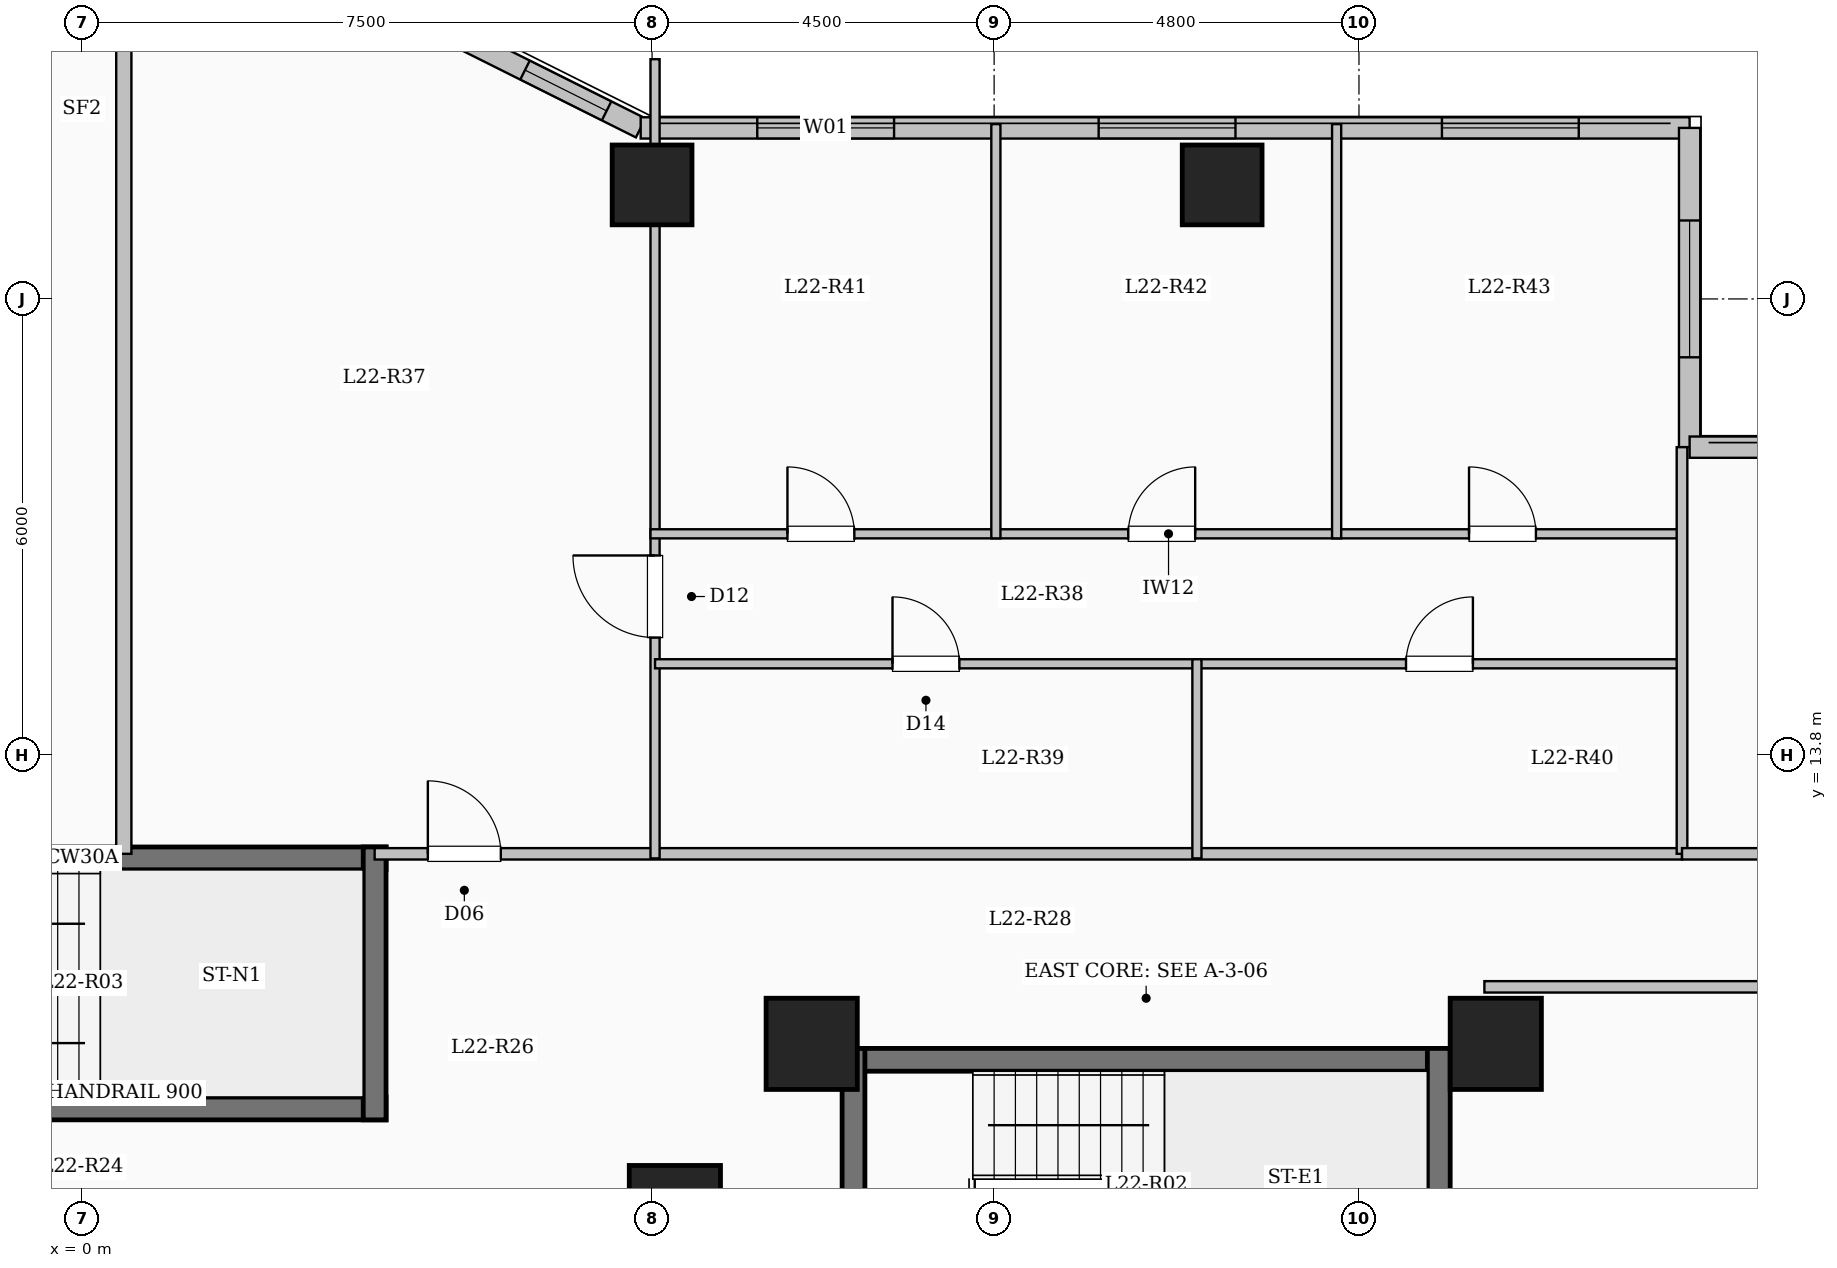
"""IFC4 building model, lengths in metres.
Left out: names, types, materials, properties, quantities, classifications, styles, units other than length and angle.
Written with IfcOpenShell. Run it as: python <this file> out.ifc"""

import sys

from ifc_helpers import new_model, si_unit, direction, frame, frame_2d, origin, origin_2d, place, context, subcontext, project, spatial, rectangle, extrude, element, fill, save


model = new_model("IFC4")
c1 = context("Model", 3, precision=1e-05, world=origin(), true_north=direction((0.0, 1.0)))
c2 = subcontext(c1, "Body", "Model", "MODEL_VIEW")
j1 = project(units=[si_unit("LENGTHUNIT", "METRE"), si_unit("PLANEANGLEUNIT", "RADIAN")], contexts=[c1])
p1 = place(None, origin())
s1 = spatial("IfcSite", under=j1, at=p1, CompositionType="ELEMENT")
p2 = place(p1, origin())
s2 = spatial("IfcBuilding", under=s1, at=p2, CompositionType="ELEMENT")
p3 = place(p2, frame((0.0, 0.0, 85.0)))
s3 = spatial("IfcBuildingStorey", under=s2, at=p3, CompositionType="ELEMENT", Elevation=85.0)
for number, where, z_axis, x_axis in (
    (1, (7.8, 7.8, 0.0), (0.0, 0.0, 1.0), (1.0, 0.0, 0.0)),
    (2, (9.6, 10.0, 0.0), (0.0, 0.0, 1.0), (1.0, 0.0, 0.0)),
    (3, (18.6, 10.0, 0.0), (0.0, 0.0, 1.0), (1.0, 0.0, 0.0)),
):
    element("IfcColumn", number, at=place(p3, frame(where, z_axis=z_axis, x_axis=x_axis)), inside=s3, PredefinedType="COLUMN", context=c2, shape_type="SweptSolid", body=[
        extrude(rectangle(XDim=1.2, YDim=1.2, at=origin_2d()), origin(), (0.0, 0.0, 1.0), 3.35),
    ])
for number, where, z_axis, x_axis in (
    (4, (7.5, 21.3, 0.0), (0.0, 0.0, 1.0), (1.0, 0.0, 0.0)),
    (5, (15.0, 21.3, 0.0), (0.0, 0.0, 1.0), (1.0, 0.0, 0.0)),
):
    element("IfcColumn", number, at=place(p3, frame(where, z_axis=z_axis, x_axis=x_axis)), inside=s3, PredefinedType="COLUMN", context=c2, shape_type="SweptSolid", body=[
        extrude(rectangle(XDim=1.05, YDim=1.05, at=origin_2d()), origin(), (0.0, 0.0, 1.0), 3.35),
    ])
p4 = place(p3, frame((4.35, 23.55, 0.0), z_axis=(0.0, 0.0, 1.0), x_axis=(0.894427191, -0.4472135955, 0.0)))
e6 = element("IfcWall", 6, at=p4, inside=s3, PredefinedType="SOLIDWALL", context=c2, shape_type="SweptSolid", body=[
    extrude(rectangle(XDim=3.354, YDim=0.28, at=frame_2d((1.677, 0.0))), origin(), (0.0, 0.0, 1.0), 3.1),
])
p5 = place(p4, frame((1.653, 0.0, 0.95)))
e7 = element("IfcOpeningElement", 7, at=p5, cuts=e6, PredefinedType="OPENING", context=c2, shape_type="SweptSolid", body=[
    extrude(rectangle(XDim=1.2, YDim=1.5, at=frame_2d((0.6, 0.75))), frame((0.0, 0.15, 0.0), z_axis=(0.0, -1.0, 0.0), x_axis=(1.0, 0.0, 0.0)), (0.0, 0.0, 1.0), 0.3),
])
p6 = place(p3, frame((7.35, 22.05, 0.0), z_axis=(0.0, 0.0, 1.0), x_axis=(1.0, 0.0, 0.0)))
e8 = element("IfcWall", 8, at=p6, inside=s3, PredefinedType="SOLIDWALL", context=c2, shape_type="SweptSolid", body=[
    extrude(rectangle(XDim=13.8, YDim=0.28, at=frame_2d((6.9, 0.0))), origin(), (0.0, 0.0, 1.0), 3.1),
])
p7 = place(p6, frame((1.534, 0.0, 0.9)))
e9 = element("IfcOpeningElement", 9, at=p7, cuts=e8, PredefinedType="OPENING", context=c2, shape_type="SweptSolid", body=[
    extrude(rectangle(XDim=1.8, YDim=1.65, at=frame_2d((0.9, 0.825))), frame((0.0, 0.15, 0.0), z_axis=(0.0, -1.0, 0.0), x_axis=(1.0, 0.0, 0.0)), (0.0, 0.0, 1.0), 0.3),
])
p8 = place(p6, frame((6.025, 0.0, 0.9)))
e10 = element("IfcOpeningElement", 10, at=p8, cuts=e8, PredefinedType="OPENING", context=c2, shape_type="SweptSolid", body=[
    extrude(rectangle(XDim=1.8, YDim=1.65, at=frame_2d((0.9, 0.825))), frame((0.0, 0.15, 0.0), z_axis=(0.0, -1.0, 0.0), x_axis=(1.0, 0.0, 0.0)), (0.0, 0.0, 1.0), 0.3),
])
p9 = place(p6, frame((10.542, 0.0, 0.9)))
e11 = element("IfcOpeningElement", 11, at=p9, cuts=e8, PredefinedType="OPENING", context=c2, shape_type="SweptSolid", body=[
    extrude(rectangle(XDim=1.8, YDim=1.65, at=frame_2d((0.9, 0.825))), frame((0.0, 0.15, 0.0), z_axis=(0.0, -1.0, 0.0), x_axis=(1.0, 0.0, 0.0)), (0.0, 0.0, 1.0), 0.3),
])
p10 = place(p3, frame((21.15, 22.05, 0.0), z_axis=(0.0, 0.0, 1.0), x_axis=(0.0, -1.0, 0.0)))
e12 = element("IfcWall", 12, at=p10, inside=s3, PredefinedType="SOLIDWALL", context=c2, shape_type="SweptSolid", body=[
    extrude(rectangle(XDim=4.2, YDim=0.28, at=frame_2d((2.1, 0.0))), origin(), (0.0, 0.0, 1.0), 3.1),
])
p11 = place(p10, frame((1.218, 0.0, 0.9)))
e13 = element("IfcOpeningElement", 13, at=p11, cuts=e12, PredefinedType="OPENING", context=c2, shape_type="SweptSolid", body=[
    extrude(rectangle(XDim=1.8, YDim=1.65, at=frame_2d((0.9, 0.825))), frame((0.0, 0.15, 0.0), z_axis=(0.0, -1.0, 0.0), x_axis=(1.0, 0.0, 0.0)), (0.0, 0.0, 1.0), 0.3),
])
p12 = place(p3, frame((21.15, 17.85, 0.0), z_axis=(0.0, 0.0, 1.0), x_axis=(1.0, 0.0, 0.0)))
e14 = element("IfcWall", 14, at=p12, inside=s3, PredefinedType="SOLIDWALL", context=c2, shape_type="SweptSolid", body=[
    extrude(rectangle(XDim=5.7, YDim=0.28, at=frame_2d((2.85, 0.0))), origin(), (0.0, 0.0, 1.0), 3.1),
])
p13 = place(p12, frame((1.825, 0.0, 0.9)))
e15 = element("IfcOpeningElement", 15, at=p13, cuts=e14, PredefinedType="OPENING", context=c2, shape_type="SweptSolid", body=[
    extrude(rectangle(XDim=2.0, YDim=1.7, at=frame_2d((1.0, 0.85))), frame((0.0, 0.15, 0.0), z_axis=(0.0, -1.0, 0.0), x_axis=(1.0, 0.0, 0.0)), (0.0, 0.0, 1.0), 0.3),
])
p14 = place(p3, frame((10.0, 9.79, 0.0), z_axis=(0.0, 0.0, 1.0), x_axis=(1.0, 0.0, 0.0)))
e16 = element("IfcWall", 16, at=p14, inside=s3, PredefinedType="SHEAR", context=c2, shape_type="SweptSolid", body=[
    extrude(rectangle(XDim=8.0, YDim=0.3, at=frame_2d((4.0, 0.0))), origin(), (0.0, 0.0, 1.0), 3.35),
])
for number, where, z_axis, x_axis in (
    (17, (10.15, 6.35, 0.0), (0.0, 0.0, 1.0), (0.0, 1.0, 0.0)),
    (18, (17.85, 6.35, 0.0), (0.0, 0.0, 1.0), (0.0, 1.0, 0.0)),
):
    element("IfcWall", number, at=place(p3, frame(where, z_axis=z_axis, x_axis=x_axis)), inside=s3, PredefinedType="SHEAR", context=c2, shape_type="SweptSolid", body=[
        extrude(rectangle(XDim=3.59, YDim=0.3, at=frame_2d((1.795, 0.0))), origin(), (0.0, 0.0, 1.0), 3.35),
    ])
p15 = place(p3, frame((-4.0, 12.44, 0.0), z_axis=(0.0, 0.0, 1.0), x_axis=(1.0, 0.0, 0.0)))
e19 = element("IfcWall", 19, at=p15, inside=s3, PredefinedType="SHEAR", context=c2, shape_type="SweptSolid", body=[
    extrude(rectangle(XDim=8.0, YDim=0.3, at=frame_2d((4.0, 0.0))), origin(), (0.0, 0.0, 1.0), 3.35),
])
p16 = place(p3, frame((-4.0, 9.15, 0.0), z_axis=(0.0, 0.0, 1.0), x_axis=(1.0, 0.0, 0.0)))
e20 = element("IfcWall", 20, at=p16, inside=s3, PredefinedType="SHEAR", context=c2, shape_type="SweptSolid", body=[
    extrude(rectangle(XDim=8.0, YDim=0.3, at=frame_2d((4.0, 0.0))), origin(), (0.0, 0.0, 1.0), 3.35),
])
p17 = place(p16, frame((0.55, 0.0, 0.0)))
e21 = element("IfcOpeningElement", 21, at=p17, cuts=e20, PredefinedType="OPENING", context=c2, shape_type="SweptSolid", body=[
    extrude(rectangle(XDim=1.0, YDim=2.15, at=frame_2d((0.5, 1.075))), frame((0.0, 0.16, 0.0), z_axis=(0.0, -1.0, 0.0), x_axis=(1.0, 0.0, 0.0)), (0.0, 0.0, 1.0), 0.32),
])
p18 = place(p3, frame((3.85, 9.0, 0.0), z_axis=(0.0, 0.0, 1.0), x_axis=(0.0, 1.0, 0.0)))
e22 = element("IfcWall", 22, at=p18, inside=s3, PredefinedType="SHEAR", context=c2, shape_type="SweptSolid", body=[
    extrude(rectangle(XDim=3.59, YDim=0.3, at=frame_2d((1.795, 0.0))), origin(), (0.0, 0.0, 1.0), 3.35),
])
p19 = place(p3, frame((3.85, 12.5, 0.0), z_axis=(0.0, 0.0, 1.0), x_axis=(1.0, 0.0, 0.0)))
e23 = element("IfcWall", 23, at=p19, inside=s3, PredefinedType="PARTITIONING", context=c2, shape_type="SweptSolid", body=[
    extrude(rectangle(XDim=17.2, YDim=0.15, at=frame_2d((8.6, 0.0))), origin(), (0.0, 0.0, 1.0), 3.1),
])
p20 = place(p19, frame((0.7, 0.0, 0.0)))
e24 = element("IfcOpeningElement", 24, at=p20, cuts=e23, PredefinedType="OPENING", context=c2, shape_type="SweptSolid", body=[
    extrude(rectangle(XDim=0.96, YDim=2.15, at=frame_2d((0.48, 1.075))), frame((0.0, 0.085, 0.0), z_axis=(0.0, -1.0, 0.0), x_axis=(1.0, 0.0, 0.0)), (0.0, 0.0, 1.0), 0.17),
])
p21 = place(p3, frame((0.55, 12.5, 0.0), z_axis=(0.0, 0.0, 1.0), x_axis=(0.0, 1.0, 0.0)))
e25 = element("IfcWall", 25, at=p21, inside=s3, PredefinedType="SOLIDWALL", context=c2, shape_type="SweptSolid", body=[
    extrude(rectangle(XDim=11.08, YDim=0.2, at=frame_2d((5.54, 0.0))), origin(), (0.0, 0.0, 1.0), 3.1),
])
p22 = place(p3, frame((7.539, 12.44, 0.0), z_axis=(0.0, 0.0, 1.0), x_axis=(0.0, 1.0, 0.0)))
e26 = element("IfcWall", 26, at=p22, inside=s3, PredefinedType="PARTITIONING", context=c2, shape_type="SweptSolid", body=[
    extrude(rectangle(XDim=10.514, YDim=0.12, at=frame_2d((5.257, 0.0))), origin(), (0.0, 0.0, 1.0), 2.435),
])
p23 = place(p22, frame((2.905, 0.0, 0.0)))
e27 = element("IfcOpeningElement", 27, at=p23, cuts=e26, PredefinedType="OPENING", context=c2, shape_type="SweptSolid", body=[
    extrude(rectangle(XDim=1.08, YDim=2.15, at=frame_2d((0.54, 1.075))), frame((0.0, 0.07, 0.0), z_axis=(0.0, -1.0, 0.0), x_axis=(1.0, 0.0, 0.0)), (0.0, 0.0, 1.0), 0.14),
])
p24 = place(p3, frame((7.539, 15.0, 0.0), z_axis=(0.0, 0.0, 1.0), x_axis=(1.0, 0.0, 0.0)))
e28 = element("IfcWall", 28, at=p24, inside=s3, PredefinedType="PARTITIONING", context=c2, shape_type="SweptSolid", body=[
    extrude(rectangle(XDim=7.129, YDim=0.12, at=frame_2d((3.564, 0.0))), origin(), (0.0, 0.0, 1.0), 3.1),
])
p25 = place(p24, frame((3.124, 0.0, 0.0)))
e29 = element("IfcOpeningElement", 29, at=p25, cuts=e28, PredefinedType="OPENING", context=c2, shape_type="SweptSolid", body=[
    extrude(rectangle(XDim=0.88, YDim=2.1, at=frame_2d((0.44, 1.05))), frame((0.0, 0.07, 0.0), z_axis=(0.0, -1.0, 0.0), x_axis=(1.0, 0.0, 0.0)), (0.0, 0.0, 1.0), 0.14),
])
p26 = place(p3, frame((14.668, 15.0, 0.0), z_axis=(0.0, 0.0, 1.0), x_axis=(1.0, 0.0, 0.0)))
e30 = element("IfcWall", 30, at=p26, inside=s3, PredefinedType="PARTITIONING", context=c2, shape_type="SweptSolid", body=[
    extrude(rectangle(XDim=6.382, YDim=0.12, at=frame_2d((3.191, 0.0))), origin(), (0.0, 0.0, 1.0), 3.1),
])
p27 = place(p26, frame((2.751, 0.0, 0.0)))
e31 = element("IfcOpeningElement", 31, at=p27, cuts=e30, PredefinedType="OPENING", context=c2, shape_type="SweptSolid", body=[
    extrude(rectangle(XDim=0.88, YDim=2.1, at=frame_2d((0.44, 1.05))), frame((0.0, 0.07, 0.0), z_axis=(0.0, -1.0, 0.0), x_axis=(1.0, 0.0, 0.0)), (0.0, 0.0, 1.0), 0.14),
])
p28 = place(p3, frame((7.479, 16.71, 0.0), z_axis=(0.0, 0.0, 1.0), x_axis=(1.0, 0.0, 0.0)))
e32 = element("IfcWall", 32, at=p28, inside=s3, PredefinedType="PARTITIONING", context=c2, shape_type="SweptSolid", body=[
    extrude(rectangle(XDim=13.631, YDim=0.12, at=frame_2d((6.815, 0.0))), origin(), (0.0, 0.0, 1.0), 3.1),
])
p29 = place(p28, frame((1.802, 0.0, 0.0)))
e33 = element("IfcOpeningElement", 33, at=p29, cuts=e32, PredefinedType="OPENING", context=c2, shape_type="SweptSolid", body=[
    extrude(rectangle(XDim=0.88, YDim=2.1, at=frame_2d((0.44, 1.05))), frame((0.0, 0.07, 0.0), z_axis=(0.0, -1.0, 0.0), x_axis=(1.0, 0.0, 0.0)), (0.0, 0.0, 1.0), 0.14),
])
p30 = place(p28, frame((6.286, 0.0, 0.0)))
e34 = element("IfcOpeningElement", 34, at=p30, cuts=e32, PredefinedType="OPENING", context=c2, shape_type="SweptSolid", body=[
    extrude(rectangle(XDim=0.88, YDim=2.1, at=frame_2d((0.44, 1.05))), frame((0.0, 0.07, 0.0), z_axis=(0.0, -1.0, 0.0), x_axis=(1.0, 0.0, 0.0)), (0.0, 0.0, 1.0), 0.14),
])
p31 = place(p28, frame((10.769, 0.0, 0.0)))
e35 = element("IfcOpeningElement", 35, at=p31, cuts=e32, PredefinedType="OPENING", context=c2, shape_type="SweptSolid", body=[
    extrude(rectangle(XDim=0.88, YDim=2.1, at=frame_2d((0.44, 1.05))), frame((0.0, 0.07, 0.0), z_axis=(0.0, -1.0, 0.0), x_axis=(1.0, 0.0, 0.0)), (0.0, 0.0, 1.0), 0.14),
])
p32 = place(p3, frame((14.668, 12.44, 0.0), z_axis=(0.0, 0.0, 1.0), x_axis=(0.0, 1.0, 0.0)))
e36 = element("IfcWall", 36, at=p32, inside=s3, PredefinedType="PARTITIONING", context=c2, shape_type="SweptSolid", body=[
    extrude(rectangle(XDim=2.62, YDim=0.12, at=frame_2d((1.31, 0.0))), origin(), (0.0, 0.0, 1.0), 3.1),
])
for number, where, z_axis, x_axis in (
    (37, (12.023, 16.65, 0.0), (0.0, 0.0, 1.0), (0.0, 1.0, 0.0)),
    (38, (16.506, 16.65, 0.0), (0.0, 0.0, 1.0), (0.0, 1.0, 0.0)),
):
    element("IfcWall", number, at=place(p3, frame(where, z_axis=z_axis, x_axis=x_axis)), inside=s3, PredefinedType="PARTITIONING", context=c2, shape_type="SweptSolid", body=[
        extrude(rectangle(XDim=5.45, YDim=0.12, at=frame_2d((2.725, 0.0))), origin(), (0.0, 0.0, 1.0), 3.1),
    ])
p33 = place(p3, frame((18.45, 10.75, 0.0), z_axis=(0.0, 0.0, 1.0), x_axis=(1.0, 0.0, 0.0)))
e39 = element("IfcWall", 39, at=p33, inside=s3, PredefinedType="PARTITIONING", context=c2, shape_type="SweptSolid", body=[
    extrude(rectangle(XDim=8.43, YDim=0.15, at=frame_2d((4.215, 0.0))), origin(), (0.0, 0.0, 1.0), 3.1),
])
p34 = place(p3, frame((21.05, 12.5, 0.0), z_axis=(0.0, 0.0, 1.0), x_axis=(0.0, 1.0, 0.0)))
e40 = element("IfcWall", 40, at=p34, inside=s3, PredefinedType="PARTITIONING", context=c2, shape_type="SweptSolid", body=[
    extrude(rectangle(XDim=5.35, YDim=0.14, at=frame_2d((2.675, 0.0))), origin(), (0.0, 0.0, 1.0), 3.1),
])
p35 = place(p3, frame((21.05, 12.5, 0.0), z_axis=(0.0, 0.0, 1.0), x_axis=(1.0, 0.0, 0.0)))
e41 = element("IfcWall", 41, at=p35, inside=s3, PredefinedType="PARTITIONING", context=c2, shape_type="SweptSolid", body=[
    extrude(rectangle(XDim=5.83, YDim=0.15, at=frame_2d((2.915, 0.0))), origin(), (0.0, 0.0, 1.0), 3.1),
])
p36 = place(p35, frame((2.44, 0.0, 0.0)))
e42 = element("IfcOpeningElement", 42, at=p36, cuts=e41, PredefinedType="OPENING", context=c2, shape_type="SweptSolid", body=[
    extrude(rectangle(XDim=0.95, YDim=2.15, at=frame_2d((0.475, 1.075))), frame((0.0, 0.085, 0.0), z_axis=(0.0, -1.0, 0.0), x_axis=(1.0, 0.0, 0.0)), (0.0, 0.0, 1.0), 0.17),
])
p37 = place(p5, origin())
e43 = element("IfcWindow", 43, at=p37, inside=s3, PartitioningType="SINGLE_PANEL", PredefinedType="WINDOW", context=c2, shape_type="SweptSolid", body=[
    extrude(rectangle(XDim=1.2, YDim=1.5, at=frame_2d((0.6, 0.75))), frame((0.0, 0.03, 0.0), z_axis=(0.0, -1.0, 0.0), x_axis=(1.0, 0.0, 0.0)), (0.0, 0.0, 1.0), 0.06),
])
fill(e7, e43)
p38 = place(p7, origin())
e44 = element("IfcWindow", 44, at=p38, inside=s3, PartitioningType="SINGLE_PANEL", PredefinedType="WINDOW", context=c2, shape_type="SweptSolid", body=[
    extrude(rectangle(XDim=1.8, YDim=1.65, at=frame_2d((0.9, 0.825))), frame((0.0, 0.03, 0.0), z_axis=(0.0, -1.0, 0.0), x_axis=(1.0, 0.0, 0.0)), (0.0, 0.0, 1.0), 0.06),
])
fill(e9, e44)
p39 = place(p8, origin())
e45 = element("IfcWindow", 45, at=p39, inside=s3, PartitioningType="SINGLE_PANEL", PredefinedType="WINDOW", context=c2, shape_type="SweptSolid", body=[
    extrude(rectangle(XDim=1.8, YDim=1.65, at=frame_2d((0.9, 0.825))), frame((0.0, 0.03, 0.0), z_axis=(0.0, -1.0, 0.0), x_axis=(1.0, 0.0, 0.0)), (0.0, 0.0, 1.0), 0.06),
])
fill(e10, e45)
p40 = place(p9, origin())
e46 = element("IfcWindow", 46, at=p40, inside=s3, PartitioningType="SINGLE_PANEL", PredefinedType="WINDOW", context=c2, shape_type="SweptSolid", body=[
    extrude(rectangle(XDim=1.8, YDim=1.65, at=frame_2d((0.9, 0.825))), frame((0.0, 0.03, 0.0), z_axis=(0.0, -1.0, 0.0), x_axis=(1.0, 0.0, 0.0)), (0.0, 0.0, 1.0), 0.06),
])
fill(e11, e46)
p41 = place(p11, origin())
e47 = element("IfcWindow", 47, at=p41, inside=s3, PartitioningType="SINGLE_PANEL", PredefinedType="WINDOW", context=c2, shape_type="SweptSolid", body=[
    extrude(rectangle(XDim=1.8, YDim=1.65, at=frame_2d((0.9, 0.825))), frame((0.0, 0.03, 0.0), z_axis=(0.0, -1.0, 0.0), x_axis=(1.0, 0.0, 0.0)), (0.0, 0.0, 1.0), 0.06),
])
fill(e13, e47)
p42 = place(p20, origin())
e48 = element("IfcDoor", 48, at=p42, inside=s3, OperationType="SINGLE_SWING_LEFT", PredefinedType="DOOR", context=c2, shape_type="SweptSolid", body=[
    extrude(rectangle(XDim=0.96, YDim=2.15, at=frame_2d((0.48, 1.075))), frame((0.0, 0.025, 0.0), z_axis=(0.0, -1.0, 0.0), x_axis=(1.0, 0.0, 0.0)), (0.0, 0.0, 1.0), 0.05),
])
fill(e24, e48)
p43 = place(p23, origin())
e49 = element("IfcDoor", 49, at=p43, inside=s3, OperationType="SINGLE_SWING_RIGHT", PredefinedType="DOOR", context=c2, shape_type="SweptSolid", body=[
    extrude(rectangle(XDim=1.08, YDim=2.15, at=frame_2d((0.54, 1.075))), frame((0.0, 0.025, 0.0), z_axis=(0.0, -1.0, 0.0), x_axis=(1.0, 0.0, 0.0)), (0.0, 0.0, 1.0), 0.05),
])
fill(e27, e49)
p44 = place(p25, origin())
e50 = element("IfcDoor", 50, at=p44, inside=s3, OperationType="SINGLE_SWING_LEFT", PredefinedType="DOOR", context=c2, shape_type="SweptSolid", body=[
    extrude(rectangle(XDim=0.88, YDim=2.1, at=frame_2d((0.44, 1.05))), frame((0.0, 0.025, 0.0), z_axis=(0.0, -1.0, 0.0), x_axis=(1.0, 0.0, 0.0)), (0.0, 0.0, 1.0), 0.05),
])
fill(e29, e50)
p45 = place(p27, origin())
e51 = element("IfcDoor", 51, at=p45, inside=s3, OperationType="SINGLE_SWING_RIGHT", PredefinedType="DOOR", context=c2, shape_type="SweptSolid", body=[
    extrude(rectangle(XDim=0.88, YDim=2.1, at=frame_2d((0.44, 1.05))), frame((0.0, 0.025, 0.0), z_axis=(0.0, -1.0, 0.0), x_axis=(1.0, 0.0, 0.0)), (0.0, 0.0, 1.0), 0.05),
])
fill(e31, e51)
p46 = place(p29, origin())
e52 = element("IfcDoor", 52, at=p46, inside=s3, OperationType="SINGLE_SWING_LEFT", PredefinedType="DOOR", context=c2, shape_type="SweptSolid", body=[
    extrude(rectangle(XDim=0.88, YDim=2.1, at=frame_2d((0.44, 1.05))), frame((0.0, 0.025, 0.0), z_axis=(0.0, -1.0, 0.0), x_axis=(1.0, 0.0, 0.0)), (0.0, 0.0, 1.0), 0.05),
])
fill(e33, e52)
p47 = place(p30, origin())
e53 = element("IfcDoor", 53, at=p47, inside=s3, OperationType="SINGLE_SWING_RIGHT", PredefinedType="DOOR", context=c2, shape_type="SweptSolid", body=[
    extrude(rectangle(XDim=0.88, YDim=2.1, at=frame_2d((0.44, 1.05))), frame((0.0, 0.025, 0.0), z_axis=(0.0, -1.0, 0.0), x_axis=(1.0, 0.0, 0.0)), (0.0, 0.0, 1.0), 0.05),
])
fill(e34, e53)
p48 = place(p31, origin())
e54 = element("IfcDoor", 54, at=p48, inside=s3, OperationType="SINGLE_SWING_LEFT", PredefinedType="DOOR", context=c2, shape_type="SweptSolid", body=[
    extrude(rectangle(XDim=0.88, YDim=2.1, at=frame_2d((0.44, 1.05))), frame((0.0, 0.025, 0.0), z_axis=(0.0, -1.0, 0.0), x_axis=(1.0, 0.0, 0.0)), (0.0, 0.0, 1.0), 0.05),
])
fill(e35, e54)
save(model, sys.argv[1])
